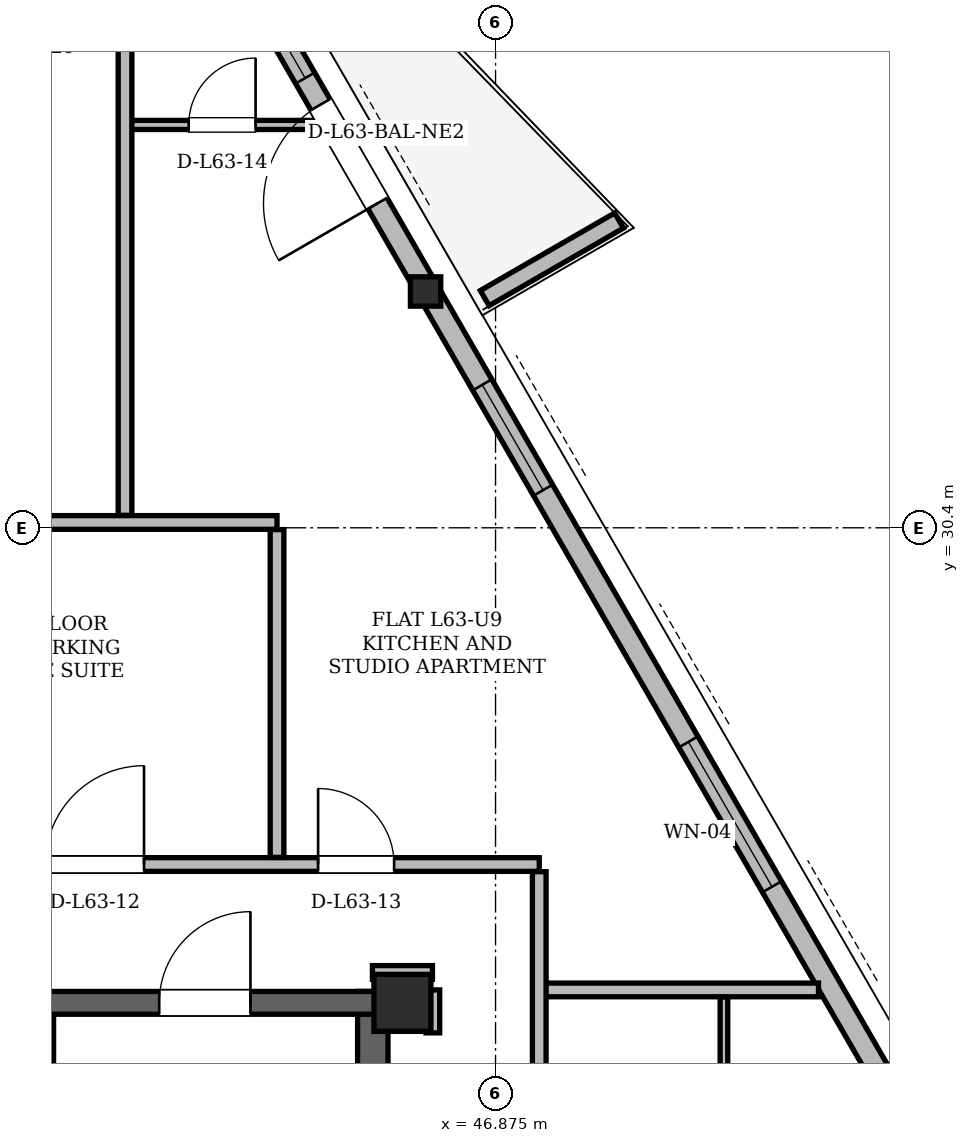
"""IFC4 building model, lengths in metres.
Left out: names, types, materials, properties, quantities, classifications, styles, units other than length and angle.
Written with IfcOpenShell. Run it as: python <this file> out.ifc"""

import sys

from ifc_helpers import new_model, si_unit, direction, frame, frame_2d, origin, origin_2d, place, context, subcontext, project, spatial, polyline, rectangle, hollow_rectangle, i_section, outline, extrude, element, fill, save


model = new_model("IFC4")
c1 = context("Model", 3, precision=1e-05, world=origin(), true_north=direction((0.0, 1.0)))
c2 = subcontext(c1, "Body", "Model", "MODEL_VIEW")
j1 = project(units=[si_unit("LENGTHUNIT", "METRE"), si_unit("PLANEANGLEUNIT", "RADIAN")], contexts=[c1])
p1 = place(None, origin())
s1 = spatial("IfcSite", under=j1, at=p1, CompositionType="ELEMENT")
p2 = place(p1, origin())
s2 = spatial("IfcBuilding", under=s1, at=p2, CompositionType="ELEMENT")
p3 = place(p2, frame((0.0, 0.0, 237.9)))
s3 = spatial("IfcBuildingStorey", under=s2, at=p3, CompositionType="ELEMENT", Elevation=237.9)
p4 = place(p3, frame((45.65, 24.15, 0.0), z_axis=(0.0, 0.0, 1.0), x_axis=(1.0, 0.0, 0.0)))
e1 = element("IfcColumn", 1, at=p4, inside=s3, PredefinedType="COLUMN", context=c2, shape_type="SweptSolid", body=[
    extrude(hollow_rectangle(XDim=0.75, YDim=0.75, WallThickness=0.06, at=origin_2d()), origin(), (0.0, 0.0, 1.0), 3.6),
])
p5 = place(p3, frame((45.984, 33.52, 0.005), z_axis=(-0.016653833078, -0.006253684258, 0.999841758118), x_axis=(0.3515421583, -0.936172051996, 0.0)))
e2 = element("IfcColumn", 2, at=p5, inside=s3, PredefinedType="COLUMN", context=c2, shape_type="SweptSolid", body=[
    extrude(i_section(OverallWidth=0.399, OverallDepth=0.386, WebThickness=0.021, FlangeThickness=0.033, at=origin_2d()), origin(), (0.0, 0.0, 1.0), 3.592),
])
p6 = place(p3, frame((45.26, 11.0, 0.0), z_axis=(0.0, 0.0, 1.0), x_axis=(0.0, 1.0, 0.0)))
e3 = element("IfcWall", 3, at=p6, inside=s3, PredefinedType="SHEAR", context=c2, shape_type="SweptSolid", body=[
    extrude(rectangle(XDim=13.3, YDim=0.4, at=frame_2d((6.65, 0.0))), origin(), (0.0, 0.0, 1.0), 3.38),
])
p7 = place(p3, frame((29.65, 24.15, 0.0), z_axis=(0.0, 0.0, 1.0), x_axis=(1.0, 0.0, 0.0)))
e4 = element("IfcWall", 4, at=p7, inside=s3, PredefinedType="SHEAR", context=c2, shape_type="SweptSolid", body=[
    extrude(rectangle(XDim=15.7, YDim=0.3, at=frame_2d((7.85, 0.0))), origin(), (0.0, 0.0, 1.0), 3.38),
])
p8 = place(p7, frame((1.7, 0.0, 0.0)))
e5 = element("IfcOpeningElement", 5, at=p8, cuts=e4, PredefinedType="OPENING", context=c2, shape_type="SweptSolid", body=[
    extrude(rectangle(XDim=1.2, YDim=2.2, at=frame_2d((0.6, 1.1))), frame((0.0, 0.15, 0.0), z_axis=(0.0, -1.0, 0.0), x_axis=(1.0, 0.0, 0.0)), (0.0, 0.0, 1.0), 0.3),
])
p9 = place(p7, frame((12.8, 0.0, 0.0)))
e6 = element("IfcOpeningElement", 6, at=p9, cuts=e4, PredefinedType="OPENING", context=c2, shape_type="SweptSolid", body=[
    extrude(rectangle(XDim=1.2, YDim=2.2, at=frame_2d((0.6, 1.1))), frame((0.0, 0.15, 0.0), z_axis=(0.0, -1.0, 0.0), x_axis=(1.0, 0.0, 0.0)), (0.0, 0.0, 1.0), 0.3),
])
p10 = place(p7, frame((7.4, 0.0, 0.0)))
e7 = element("IfcOpeningElement", 7, at=p10, cuts=e4, PredefinedType="OPENING", context=c2, shape_type="SweptSolid", body=[
    extrude(rectangle(XDim=0.9, YDim=2.05, at=frame_2d((0.45, 1.025))), frame((0.0, 0.15, 0.0), z_axis=(0.0, -1.0, 0.0), x_axis=(1.0, 0.0, 0.0)), (0.0, 0.0, 1.0), 0.3),
])
p11 = place(p3, frame((58.899, 11.151, 0.0), z_axis=(0.0, 0.0, 1.0), x_axis=(-0.500002325133, 0.866024061364, 0.0)))
e8 = element("IfcWall", 8, at=p11, inside=s3, PredefinedType="SOLIDWALL", context=c2, shape_type="SweptSolid", body=[
    extrude(rectangle(XDim=36.9, YDim=0.29, at=frame_2d((18.45, 0.0))), origin(), (0.0, 0.0, 1.0), 2.677),
])
p12 = place(p11, frame((3.429, 0.0, 0.0)))
e9 = element("IfcOpeningElement", 9, at=p12, cuts=e8, PredefinedType="OPENING", context=c2, shape_type="SweptSolid", body=[
    extrude(rectangle(XDim=1.5, YDim=2.2, at=frame_2d((0.75, 1.1))), frame((0.0, 0.145, 0.0), z_axis=(0.0, -1.0, 0.0), x_axis=(1.0, 0.0, 0.0)), (0.0, 0.0, 1.0), 0.29),
])
p13 = place(p11, frame((27.156, 0.0, 0.0)))
e10 = element("IfcOpeningElement", 10, at=p13, cuts=e8, PredefinedType="OPENING", context=c2, shape_type="SweptSolid", body=[
    extrude(rectangle(XDim=1.5, YDim=2.2, at=frame_2d((0.75, 1.1))), frame((0.0, 0.145, 0.0), z_axis=(0.0, -1.0, 0.0), x_axis=(1.0, 0.0, 0.0)), (0.0, 0.0, 1.0), 0.29),
])
p14 = place(p11, frame((6.97, 0.0, 0.85)))
e11 = element("IfcOpeningElement", 11, at=p14, cuts=e8, PredefinedType="OPENING", context=c2, shape_type="SweptSolid", body=[
    extrude(rectangle(XDim=1.6, YDim=1.7, at=frame_2d((0.8, 0.85))), frame((0.0, 0.145, 0.0), z_axis=(0.0, -1.0, 0.0), x_axis=(1.0, 0.0, 0.0)), (0.0, 0.0, 1.0), 0.29),
])
p15 = place(p11, frame((1.106, 0.0, 0.85)))
e12 = element("IfcOpeningElement", 12, at=p15, cuts=e8, PredefinedType="OPENING", context=c2, shape_type="SweptSolid", body=[
    extrude(rectangle(XDim=1.6, YDim=1.7, at=frame_2d((0.8, 0.85))), frame((0.0, 0.145, 0.0), z_axis=(0.0, -1.0, 0.0), x_axis=(1.0, 0.0, 0.0)), (0.0, 0.0, 1.0), 0.29),
])
p16 = place(p11, frame((34.697, 0.0, 0.85)))
e13 = element("IfcOpeningElement", 13, at=p16, cuts=e8, PredefinedType="OPENING", context=c2, shape_type="SweptSolid", body=[
    extrude(rectangle(XDim=1.2, YDim=1.48, at=frame_2d((0.6, 0.74))), frame((0.0, 0.145, 0.0), z_axis=(0.0, -1.0, 0.0), x_axis=(1.0, 0.0, 0.0)), (0.0, 0.0, 1.0), 0.29),
])
p17 = place(p11, frame((16.774, 0.0, 0.85)))
e14 = element("IfcOpeningElement", 14, at=p17, cuts=e8, PredefinedType="OPENING", context=c2, shape_type="SweptSolid", body=[
    extrude(rectangle(XDim=2.2, YDim=1.717, at=frame_2d((1.1, 0.858))), frame((0.0, 0.145, 0.0), z_axis=(0.0, -1.0, 0.0), x_axis=(1.0, 0.0, 0.0)), (0.0, 0.0, 1.0), 0.29),
])
p18 = place(p11, frame((22.799, 0.0, 0.85)))
e15 = element("IfcOpeningElement", 15, at=p18, cuts=e8, PredefinedType="OPENING", context=c2, shape_type="SweptSolid", body=[
    extrude(rectangle(XDim=1.6, YDim=1.7, at=frame_2d((0.8, 0.85))), frame((0.0, 0.145, 0.0), z_axis=(0.0, -1.0, 0.0), x_axis=(1.0, 0.0, 0.0)), (0.0, 0.0, 1.0), 0.29),
])
p19 = place(p11, frame((29.059, 0.0, 0.85)))
e16 = element("IfcOpeningElement", 16, at=p19, cuts=e8, PredefinedType="OPENING", context=c2, shape_type="SweptSolid", body=[
    extrude(rectangle(XDim=1.2, YDim=1.48, at=frame_2d((0.6, 0.74))), frame((0.0, 0.145, 0.0), z_axis=(0.0, -1.0, 0.0), x_axis=(1.0, 0.0, 0.0)), (0.0, 0.0, 1.0), 0.29),
])
p20 = place(p11, frame((31.635, 0.0, 0.85)))
e17 = element("IfcOpeningElement", 17, at=p20, cuts=e8, PredefinedType="OPENING", context=c2, shape_type="SweptSolid", body=[
    extrude(rectangle(XDim=1.2, YDim=1.48, at=frame_2d((0.6, 0.74))), frame((0.0, 0.145, 0.0), z_axis=(0.0, -1.0, 0.0), x_axis=(1.0, 0.0, 0.0)), (0.0, 0.0, 1.0), 0.29),
])
p21 = place(p11, frame((12.419, 0.0, 0.85)))
e18 = element("IfcOpeningElement", 18, at=p21, cuts=e8, PredefinedType="OPENING", context=c2, shape_type="SweptSolid", body=[
    extrude(rectangle(XDim=1.2, YDim=1.48, at=frame_2d((0.6, 0.74))), frame((0.0, 0.145, 0.0), z_axis=(0.0, -1.0, 0.0), x_axis=(1.0, 0.0, 0.0)), (0.0, 0.0, 1.0), 0.29),
])
p22 = place(p3, frame((46.732, 33.421, 0.0), z_axis=(0.0, 0.0, 1.0), x_axis=(0.866042246008, 0.499970827278, 0.0)))
e19 = element("IfcWall", 19, at=p22, inside=s3, PredefinedType="PARAPET", context=c2, shape_type="SweptSolid", body=[
    extrude(outline(polyline([(0.0, 0.0), (2.042, 0.0), (2.042, 1.1), (0.0, 1.32), (0.0, 0.0)])), frame((0.0, 0.115, 0.0), z_axis=(0.0, -1.0, 0.0), x_axis=(1.0, 0.0, 0.0)), (0.0, 0.0, 1.0), 0.23),
])
p23 = place(p3, frame((40.96, 19.48, 0.0), z_axis=(0.0, 0.0, 1.0), x_axis=(0.0, 1.0, 0.0)))
e20 = element("IfcWall", 20, at=p23, inside=s3, PredefinedType="PARTITIONING", context=c2, shape_type="SweptSolid", body=[
    extrude(rectangle(XDim=4.5, YDim=0.2, at=frame_2d((2.25, 0.0))), origin(), (0.0, 0.0, 1.0), 3.38),
])
p24 = place(p23, frame((2.12, 0.0, 0.0)))
e21 = element("IfcOpeningElement", 21, at=p24, cuts=e20, PredefinedType="OPENING", context=c2, shape_type="SweptSolid", body=[
    extrude(rectangle(XDim=1.1, YDim=2.2, at=frame_2d((0.55, 1.1))), frame((0.0, 0.1, 0.0), z_axis=(0.0, -1.0, 0.0), x_axis=(1.0, 0.0, 0.0)), (0.0, 0.0, 1.0), 0.2),
])
p25 = place(p3, frame((47.45, 24.32, 0.0), z_axis=(0.0, 0.0, 1.0), x_axis=(1.0, 0.0, 0.0)))
e22 = element("IfcWall", 22, at=p25, inside=s3, PredefinedType="PARTITIONING", context=c2, shape_type="SweptSolid", body=[
    extrude(rectangle(XDim=3.674, YDim=0.18, at=frame_2d((1.837, 0.0))), origin(), (0.0, 0.0, 1.0), 3.38),
])
p26 = place(p3, frame((45.255, 24.55, 0.0), z_axis=(0.0, 0.0, 1.0), x_axis=(1.0, 0.0, 0.0)))
e23 = element("IfcWall", 23, at=p26, inside=s3, PredefinedType="PARTITIONING", context=c2, shape_type="SweptSolid", body=[
    extrude(rectangle(XDim=0.79, YDim=0.18, at=frame_2d((0.395, 0.0))), origin(), (0.0, 0.0, 1.0), 2.913),
])
p27 = place(p3, frame((25.6, 25.97, 0.0), z_axis=(0.0, 0.0, 1.0), x_axis=(1.0, 0.0, 0.0)))
e24 = element("IfcWall", 24, at=p27, inside=s3, PredefinedType="PARTITIONING", context=c2, shape_type="SweptSolid", body=[
    extrude(rectangle(XDim=21.85, YDim=0.18, at=frame_2d((10.925, 0.0))), origin(), (0.0, 0.0, 1.0), 2.913),
])
p28 = place(p27, frame((3.87, 0.0, 0.0)))
e25 = element("IfcOpeningElement", 25, at=p28, cuts=e24, PredefinedType="OPENING", context=c2, shape_type="SweptSolid", body=[
    extrude(rectangle(XDim=1.0, YDim=2.18, at=frame_2d((0.5, 1.09))), frame((0.0, 0.09, 0.0), z_axis=(0.0, -1.0, 0.0), x_axis=(1.0, 0.0, 0.0)), (0.0, 0.0, 1.0), 0.18),
])
p29 = place(p27, frame((9.833, 0.0, 0.0)))
e26 = element("IfcOpeningElement", 26, at=p29, cuts=e24, PredefinedType="OPENING", context=c2, shape_type="SweptSolid", body=[
    extrude(rectangle(XDim=1.0, YDim=2.18, at=frame_2d((0.5, 1.09))), frame((0.0, 0.09, 0.0), z_axis=(0.0, -1.0, 0.0), x_axis=(1.0, 0.0, 0.0)), (0.0, 0.0, 1.0), 0.18),
])
p30 = place(p27, frame((15.35, 0.0, 0.0)))
e27 = element("IfcOpeningElement", 27, at=p30, cuts=e24, PredefinedType="OPENING", context=c2, shape_type="SweptSolid", body=[
    extrude(rectangle(XDim=1.3, YDim=2.2, at=frame_2d((0.65, 1.1))), frame((0.0, 0.09, 0.0), z_axis=(0.0, -1.0, 0.0), x_axis=(1.0, 0.0, 0.0)), (0.0, 0.0, 1.0), 0.18),
])
p31 = place(p27, frame((18.94, 0.0, 0.0)))
e28 = element("IfcOpeningElement", 28, at=p31, cuts=e24, PredefinedType="OPENING", context=c2, shape_type="SweptSolid", body=[
    extrude(rectangle(XDim=1.0, YDim=2.18, at=frame_2d((0.5, 1.09))), frame((0.0, 0.09, 0.0), z_axis=(0.0, -1.0, 0.0), x_axis=(1.0, 0.0, 0.0)), (0.0, 0.0, 1.0), 0.18),
])
p32 = place(p3, frame((39.2, 30.47, 0.0), z_axis=(0.0, 0.0, 1.0), x_axis=(1.0, 0.0, 0.0)))
e29 = element("IfcWall", 29, at=p32, inside=s3, PredefinedType="PARTITIONING", context=c2, shape_type="SweptSolid", body=[
    extrude(rectangle(XDim=4.8, YDim=0.18, at=frame_2d((2.4, 0.0))), origin(), (0.0, 0.0, 1.0), 2.913),
])
p33 = place(p3, frame((41.918, 35.7, 0.0), z_axis=(0.0, 0.0, 1.0), x_axis=(1.0, 0.0, 0.0)))
e30 = element("IfcWall", 30, at=p33, inside=s3, PredefinedType="PARTITIONING", context=c2, shape_type="SweptSolid", body=[
    extrude(rectangle(XDim=2.636, YDim=0.12, at=frame_2d((1.318, 0.0))), origin(), (0.0, 0.0, 1.0), 2.913),
])
p34 = place(p33, frame((0.92, 0.0, 0.0)))
e31 = element("IfcOpeningElement", 31, at=p34, cuts=e30, PredefinedType="OPENING", context=c2, shape_type="SweptSolid", body=[
    extrude(rectangle(XDim=0.88, YDim=2.08, at=frame_2d((0.44, 1.04))), frame((0.0, 0.06, 0.0), z_axis=(0.0, -1.0, 0.0), x_axis=(1.0, 0.0, 0.0)), (0.0, 0.0, 1.0), 0.12),
])
p35 = place(p3, frame((42.0, 30.564, 0.0), z_axis=(0.0, 0.0, 1.0), x_axis=(0.0, 1.0, 0.0)))
e32 = element("IfcWall", 32, at=p35, inside=s3, PredefinedType="PARTITIONING", context=c2, shape_type="SweptSolid", body=[
    extrude(rectangle(XDim=9.559, YDim=0.18, at=frame_2d((4.78, 0.0))), origin(), (0.0, 0.0, 1.0), 2.913),
])
p36 = place(p3, frame((44.0, 26.064, 0.0), z_axis=(0.0, 0.0, 1.0), x_axis=(0.0, 1.0, 0.0)))
e33 = element("IfcWall", 33, at=p36, inside=s3, PredefinedType="PARTITIONING", context=c2, shape_type="SweptSolid", body=[
    extrude(rectangle(XDim=4.312, YDim=0.18, at=frame_2d((2.156, 0.0))), origin(), (0.0, 0.0, 1.0), 2.913),
])
p37 = place(p3, frame((46.05, 23.755, 0.0), z_axis=(0.0, 0.0, 1.0), x_axis=(0.0, 1.0, 0.0)))
e34 = element("IfcWall", 34, at=p37, inside=s3, PredefinedType="PARTITIONING", context=c2, shape_type="SweptSolid", body=[
    extrude(rectangle(XDim=0.565, YDim=0.18, at=frame_2d((0.283, 0.0))), origin(), (0.0, 0.0, 1.0), 3.38),
])
p38 = place(p3, frame((47.45, 9.394, 0.0), z_axis=(0.0, 0.0, 1.0), x_axis=(0.0, 1.0, 0.0)))
e35 = element("IfcWall", 35, at=p38, inside=s3, PredefinedType="PARTITIONING", context=c2, shape_type="SweptSolid", body=[
    extrude(rectangle(XDim=16.482, YDim=0.18, at=frame_2d((8.241, 0.0))), origin(), (0.0, 0.0, 1.0), 2.913),
])
p39 = place(p38, frame((6.247, 0.0, 0.0)))
e36 = element("IfcOpeningElement", 36, at=p39, cuts=e35, PredefinedType="OPENING", context=c2, shape_type="SweptSolid", body=[
    extrude(rectangle(XDim=1.0, YDim=2.18, at=frame_2d((0.5, 1.09))), frame((0.0, 0.09, 0.0), z_axis=(0.0, -1.0, 0.0), x_axis=(1.0, 0.0, 0.0)), (0.0, 0.0, 1.0), 0.18),
])
p40 = place(p38, frame((10.379, 0.0, 0.0)))
e37 = element("IfcOpeningElement", 37, at=p40, cuts=e35, PredefinedType="OPENING", context=c2, shape_type="SweptSolid", body=[
    extrude(rectangle(XDim=1.0, YDim=2.18, at=frame_2d((0.5, 1.09))), frame((0.0, 0.09, 0.0), z_axis=(0.0, -1.0, 0.0), x_axis=(1.0, 0.0, 0.0)), (0.0, 0.0, 1.0), 0.18),
])
p41 = place(p3, frame((49.88, 21.974, 0.0), z_axis=(0.0, 0.0, 1.0), x_axis=(0.0, 1.0, 0.0)))
e38 = element("IfcWall", 38, at=p41, inside=s3, PredefinedType="PARTITIONING", context=c2, shape_type="SweptSolid", body=[
    extrude(rectangle(XDim=2.252, YDim=0.1, at=frame_2d((1.126, 0.0))), origin(), (0.0, 0.0, 1.0), 3.38),
])
p42 = place(p13, origin())
e39 = element("IfcDoor", 39, at=p42, inside=s3, OperationType="SINGLE_SWING_LEFT", PredefinedType="DOOR", context=c2, shape_type="SweptSolid", body=[
    extrude(rectangle(XDim=1.5, YDim=2.2, at=frame_2d((0.75, 1.1))), frame((0.0, 0.025, 0.0), z_axis=(0.0, -1.0, 0.0), x_axis=(1.0, 0.0, 0.0)), (0.0, 0.0, 1.0), 0.05),
])
fill(e10, e39)
p43 = place(p17, origin())
e40 = element("IfcWindow", 40, at=p43, inside=s3, PartitioningType="SINGLE_PANEL", PredefinedType="WINDOW", context=c2, shape_type="SweptSolid", body=[
    extrude(rectangle(XDim=2.2, YDim=1.717, at=frame_2d((1.1, 0.858))), frame((0.0, 0.03, 0.0), z_axis=(0.0, -1.0, 0.0), x_axis=(1.0, 0.0, 0.0)), (0.0, 0.0, 1.0), 0.06),
])
fill(e14, e40)
p44 = place(p18, origin())
e41 = element("IfcWindow", 41, at=p44, inside=s3, PartitioningType="SINGLE_PANEL", PredefinedType="WINDOW", context=c2, shape_type="SweptSolid", body=[
    extrude(rectangle(XDim=1.6, YDim=1.7, at=frame_2d((0.8, 0.85))), frame((0.0, 0.03, 0.0), z_axis=(0.0, -1.0, 0.0), x_axis=(1.0, 0.0, 0.0)), (0.0, 0.0, 1.0), 0.06),
])
fill(e15, e41)
p45 = place(p19, origin())
e42 = element("IfcWindow", 42, at=p45, inside=s3, PartitioningType="SINGLE_PANEL", PredefinedType="WINDOW", context=c2, shape_type="SweptSolid", body=[
    extrude(rectangle(XDim=1.2, YDim=1.48, at=frame_2d((0.6, 0.74))), frame((0.0, 0.03, 0.0), z_axis=(0.0, -1.0, 0.0), x_axis=(1.0, 0.0, 0.0)), (0.0, 0.0, 1.0), 0.06),
])
fill(e16, e42)
p46 = place(p9, origin())
e43 = element("IfcDoor", 43, at=p46, inside=s3, OperationType="SINGLE_SWING_RIGHT", PredefinedType="DOOR", context=c2, shape_type="SweptSolid", body=[
    extrude(rectangle(XDim=1.2, YDim=2.2, at=frame_2d((0.6, 1.1))), frame((0.0, 0.025, 0.0), z_axis=(0.0, -1.0, 0.0), x_axis=(1.0, 0.0, 0.0)), (0.0, 0.0, 1.0), 0.05),
])
fill(e6, e43)
p47 = place(p30, origin())
e44 = element("IfcDoor", 44, at=p47, inside=s3, OperationType="SINGLE_SWING_RIGHT", PredefinedType="DOOR", context=c2, shape_type="SweptSolid", body=[
    extrude(rectangle(XDim=1.3, YDim=2.2, at=frame_2d((0.65, 1.1))), frame((0.0, 0.025, 0.0), z_axis=(0.0, -1.0, 0.0), x_axis=(1.0, 0.0, 0.0)), (0.0, 0.0, 1.0), 0.05),
])
fill(e27, e44)
p48 = place(p31, origin())
e45 = element("IfcDoor", 45, at=p48, inside=s3, OperationType="SINGLE_SWING_LEFT", PredefinedType="DOOR", context=c2, shape_type="SweptSolid", body=[
    extrude(rectangle(XDim=1.0, YDim=2.18, at=frame_2d((0.5, 1.09))), frame((0.0, 0.025, 0.0), z_axis=(0.0, -1.0, 0.0), x_axis=(1.0, 0.0, 0.0)), (0.0, 0.0, 1.0), 0.05),
])
fill(e28, e45)
p49 = place(p34, origin())
e46 = element("IfcDoor", 46, at=p49, inside=s3, OperationType="SINGLE_SWING_RIGHT", PredefinedType="DOOR", context=c2, shape_type="SweptSolid", body=[
    extrude(rectangle(XDim=0.88, YDim=2.08, at=frame_2d((0.44, 1.04))), frame((0.0, 0.025, 0.0), z_axis=(0.0, -1.0, 0.0), x_axis=(1.0, 0.0, 0.0)), (0.0, 0.0, 1.0), 0.05),
])
fill(e31, e46)
save(model, sys.argv[1])
